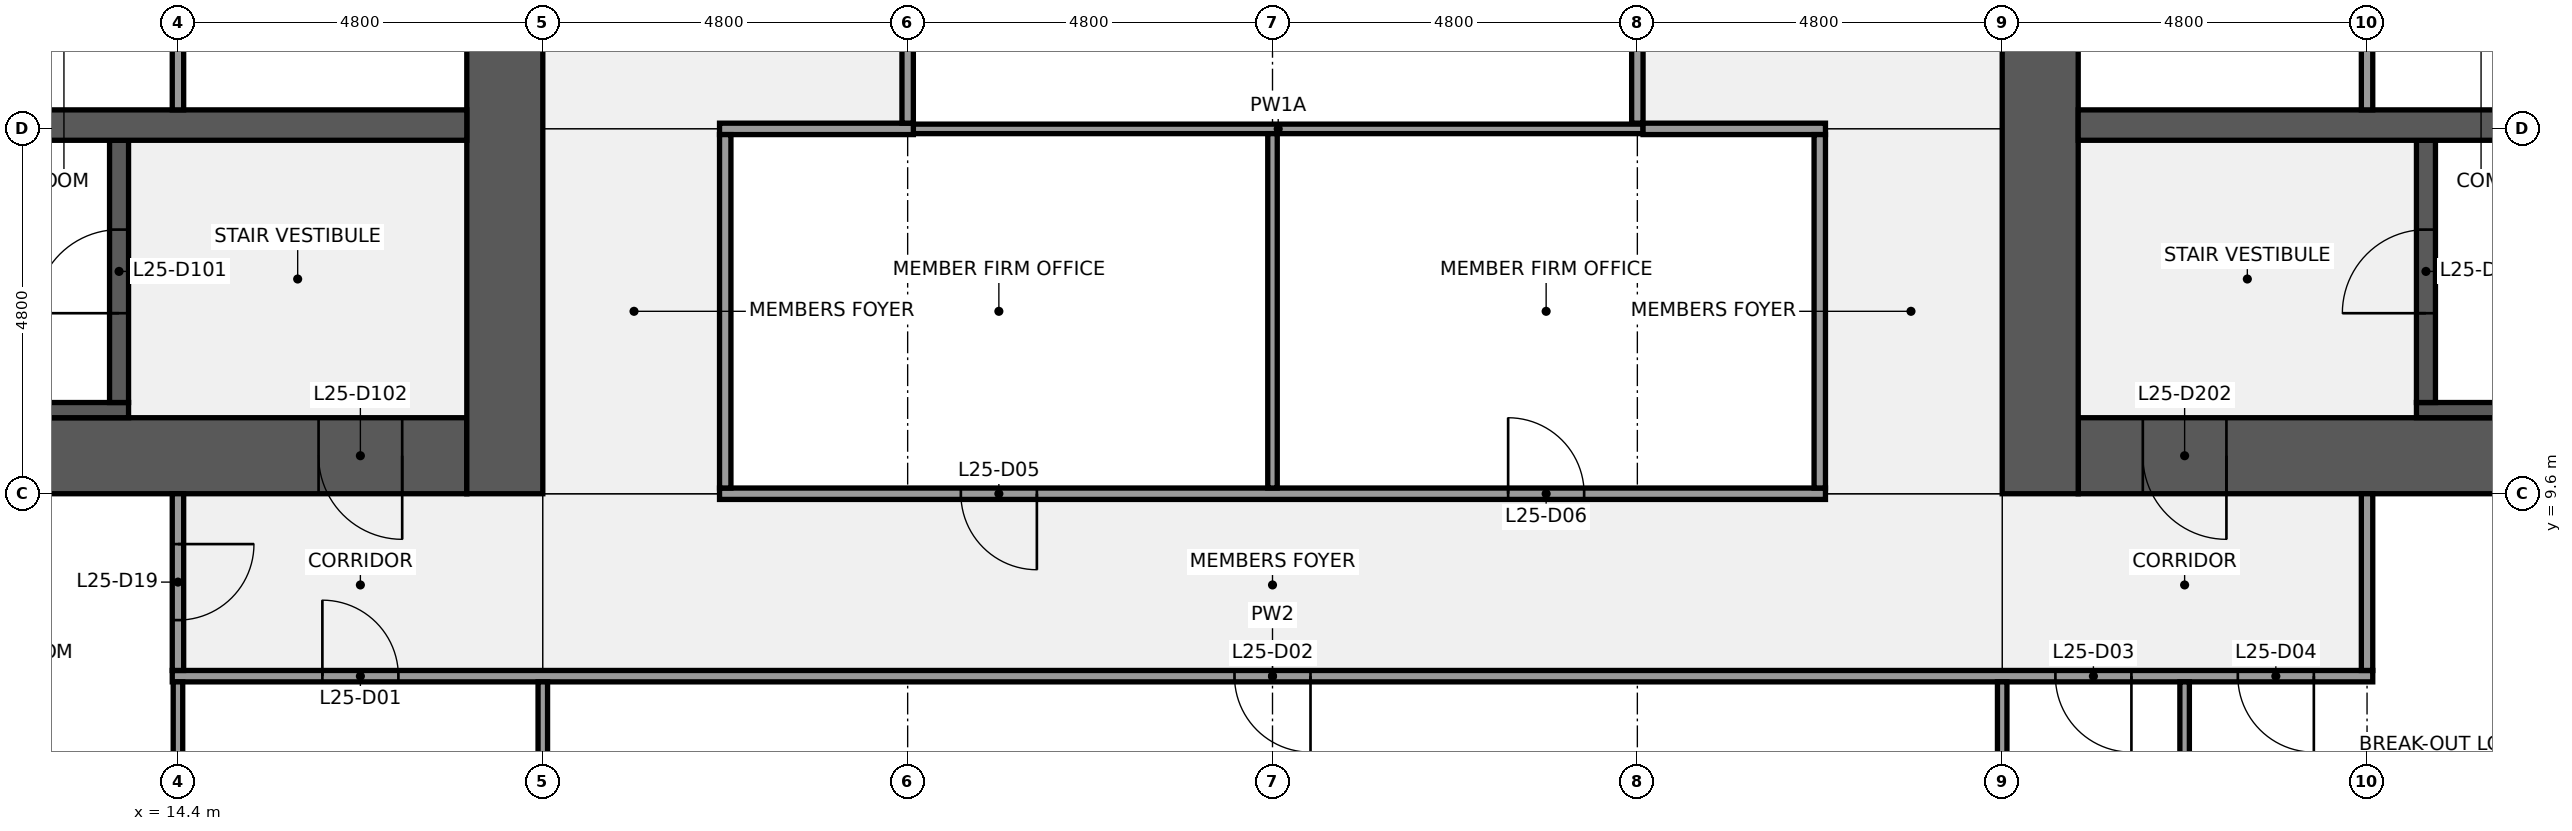
"""IFC4 building model, lengths in metres.
Left out: names, types, materials, properties, quantities, classifications, styles, units other than length and angle.
Written with IfcOpenShell. Run it as: python <this file> out.ifc"""

import sys

from ifc_helpers import new_model, si_unit, direction, frame, frame_2d, origin, place, context, subcontext, project, spatial, rectangle, extrude, element, fill, save


model = new_model("IFC4")
c1 = context("Model", 3, precision=1e-05, world=origin(), true_north=direction((0.0, 1.0)))
c2 = subcontext(c1, "Body", "Model", "MODEL_VIEW")
j1 = project(units=[si_unit("LENGTHUNIT", "METRE"), si_unit("PLANEANGLEUNIT", "RADIAN")], contexts=[c1])
p1 = place(None, origin())
s1 = spatial("IfcSite", under=j1, at=p1, CompositionType="ELEMENT")
p2 = place(p1, origin())
s2 = spatial("IfcBuilding", under=s1, at=p2, CompositionType="ELEMENT")
p3 = place(p2, frame((0.0, 0.0, 120.1)))
s3 = spatial("IfcBuildingStorey", under=s2, at=p3, CompositionType="ELEMENT", Elevation=120.1)
p4 = place(p3, frame((18.2, 10.1, 0.0), z_axis=(0.0, 0.0, 1.0), x_axis=(-1.0, 0.0, 0.0)))
e1 = element("IfcWall", 1, at=p4, inside=s3, PredefinedType="SHEAR", context=c2, shape_type="SweptSolid", body=[
    extrude(rectangle(XDim=8.6, YDim=1.0, at=frame_2d((4.3, 0.0))), origin(), (0.0, 0.0, 1.0), 3.84),
])
p5 = place(p4, frame((0.85, 0.0, 0.0)))
e2 = element("IfcOpeningElement", 2, at=p5, cuts=e1, PredefinedType="OPENING", context=c2, shape_type="SweptSolid", body=[
    extrude(rectangle(XDim=1.1, YDim=2.1, at=frame_2d((0.55, 1.05))), frame((0.0, 0.51, 0.0), z_axis=(0.0, -1.0, 0.0), x_axis=(1.0, 0.0, 0.0)), (0.0, 0.0, 1.0), 1.02),
])
p6 = place(p3, frame((18.7, 38.4, 0.0), z_axis=(0.0, 0.0, 1.0), x_axis=(0.0, -1.0, 0.0)))
e3 = element("IfcWall", 3, at=p6, inside=s3, PredefinedType="SHEAR", context=c2, shape_type="SweptSolid", body=[
    extrude(rectangle(XDim=28.8, YDim=1.0, at=frame_2d((14.4, 0.0))), origin(), (0.0, 0.0, 1.0), 3.84),
])
p7 = place(p6, frame((18.3, 0.0, 0.0)))
e4 = element("IfcOpeningElement", 4, at=p7, cuts=e3, PredefinedType="OPENING", context=c2, shape_type="SweptSolid", body=[
    extrude(rectangle(XDim=1.8, YDim=2.1, at=frame_2d((0.9, 1.05))), frame((0.0, 0.51, 0.0), z_axis=(0.0, -1.0, 0.0), x_axis=(1.0, 0.0, 0.0)), (0.0, 0.0, 1.0), 1.02),
])
p8 = place(p6, frame((8.7, 0.0, 0.0)))
e5 = element("IfcOpeningElement", 5, at=p8, cuts=e3, PredefinedType="OPENING", context=c2, shape_type="SweptSolid", body=[
    extrude(rectangle(XDim=1.8, YDim=2.1, at=frame_2d((0.9, 1.05))), frame((0.0, 0.51, 0.0), z_axis=(0.0, -1.0, 0.0), x_axis=(1.0, 0.0, 0.0)), (0.0, 0.0, 1.0), 1.02),
])
p9 = place(p3, frame((9.6, 10.7, 0.0), z_axis=(0.0, 0.0, 1.0), x_axis=(1.0, 0.0, 0.0)))
e6 = element("IfcWall", 6, at=p9, inside=s3, PredefinedType="SHEAR", context=c2, shape_type="SweptSolid", body=[
    extrude(rectangle(XDim=4.15, YDim=0.2, at=frame_2d((2.075, 0.0))), origin(), (0.0, 0.0, 1.0), 3.84),
])
p10 = place(p3, frame((13.625, 10.8, 0.0), z_axis=(0.0, 0.0, 1.0), x_axis=(0.0, 1.0, 0.0)))
e7 = element("IfcWall", 7, at=p10, inside=s3, PredefinedType="SHEAR", context=c2, shape_type="SweptSolid", body=[
    extrude(rectangle(XDim=3.45, YDim=0.25, at=frame_2d((1.725, 0.0))), origin(), (0.0, 0.0, 1.0), 3.84),
])
p11 = place(p10, frame((1.175, 0.0, 0.0)))
e8 = element("IfcOpeningElement", 8, at=p11, cuts=e7, PredefinedType="OPENING", context=c2, shape_type="SweptSolid", body=[
    extrude(rectangle(XDim=1.1, YDim=2.1, at=frame_2d((0.55, 1.05))), frame((0.0, 0.135, 0.0), z_axis=(0.0, -1.0, 0.0), x_axis=(1.0, 0.0, 0.0)), (0.0, 0.0, 1.0), 0.27),
])
p12 = place(p3, frame((1.0, 14.45, 0.0), z_axis=(0.0, 0.0, 1.0), x_axis=(1.0, 0.0, 0.0)))
e9 = element("IfcWall", 9, at=p12, inside=s3, PredefinedType="SHEAR", context=c2, shape_type="SweptSolid", body=[
    extrude(rectangle(XDim=17.2, YDim=0.4, at=frame_2d((8.6, 0.0))), origin(), (0.0, 0.0, 1.0), 3.84),
])
p13 = place(p3, frame((14.4, 14.65, 0.0), z_axis=(0.0, 0.0, 1.0), x_axis=(0.0, 1.0, 0.0)))
e10 = element("IfcWall", 10, at=p13, inside=s3, PredefinedType="PARTITIONING", context=c2, shape_type="SweptSolid", body=[
    extrude(rectangle(XDim=2.6, YDim=0.15, at=frame_2d((1.3, 0.0))), origin(), (0.0, 0.0, 1.0), 3.84),
])
p14 = place(p3, frame((48.0, 10.1, 0.0), z_axis=(0.0, 0.0, 1.0), x_axis=(-1.0, 0.0, 0.0)))
e11 = element("IfcWall", 11, at=p14, inside=s3, PredefinedType="SHEAR", context=c2, shape_type="SweptSolid", body=[
    extrude(rectangle(XDim=8.6, YDim=1.0, at=frame_2d((4.3, 0.0))), origin(), (0.0, 0.0, 1.0), 3.84),
])
p15 = place(p14, frame((6.65, 0.0, 0.0)))
e12 = element("IfcOpeningElement", 12, at=p15, cuts=e11, PredefinedType="OPENING", context=c2, shape_type="SweptSolid", body=[
    extrude(rectangle(XDim=1.1, YDim=2.1, at=frame_2d((0.55, 1.05))), frame((0.0, 0.51, 0.0), z_axis=(0.0, -1.0, 0.0), x_axis=(1.0, 0.0, 0.0)), (0.0, 0.0, 1.0), 1.02),
])
p16 = place(p3, frame((38.9, 9.6, 0.0), z_axis=(0.0, 0.0, 1.0), x_axis=(0.0, 1.0, 0.0)))
e13 = element("IfcWall", 13, at=p16, inside=s3, PredefinedType="SHEAR", context=c2, shape_type="SweptSolid", body=[
    extrude(rectangle(XDim=28.8, YDim=1.0, at=frame_2d((14.4, 0.0))), origin(), (0.0, 0.0, 1.0), 3.84),
])
p17 = place(p16, frame((8.7, 0.0, 0.0)))
e14 = element("IfcOpeningElement", 14, at=p17, cuts=e13, PredefinedType="OPENING", context=c2, shape_type="SweptSolid", body=[
    extrude(rectangle(XDim=1.8, YDim=2.1, at=frame_2d((0.9, 1.05))), frame((0.0, 0.51, 0.0), z_axis=(0.0, -1.0, 0.0), x_axis=(1.0, 0.0, 0.0)), (0.0, 0.0, 1.0), 1.02),
])
p18 = place(p16, frame((18.3, 0.0, 0.0)))
e15 = element("IfcOpeningElement", 15, at=p18, cuts=e13, PredefinedType="OPENING", context=c2, shape_type="SweptSolid", body=[
    extrude(rectangle(XDim=1.8, YDim=2.1, at=frame_2d((0.9, 1.05))), frame((0.0, 0.51, 0.0), z_axis=(0.0, -1.0, 0.0), x_axis=(1.0, 0.0, 0.0)), (0.0, 0.0, 1.0), 1.02),
])
p19 = place(p3, frame((43.85, 10.7, 0.0), z_axis=(0.0, 0.0, 1.0), x_axis=(1.0, 0.0, 0.0)))
e16 = element("IfcWall", 16, at=p19, inside=s3, PredefinedType="SHEAR", context=c2, shape_type="SweptSolid", body=[
    extrude(rectangle(XDim=4.15, YDim=0.2, at=frame_2d((2.075, 0.0))), origin(), (0.0, 0.0, 1.0), 3.84),
])
p20 = place(p3, frame((43.975, 10.8, 0.0), z_axis=(0.0, 0.0, 1.0), x_axis=(0.0, 1.0, 0.0)))
e17 = element("IfcWall", 17, at=p20, inside=s3, PredefinedType="SHEAR", context=c2, shape_type="SweptSolid", body=[
    extrude(rectangle(XDim=3.45, YDim=0.25, at=frame_2d((1.725, 0.0))), origin(), (0.0, 0.0, 1.0), 3.84),
])
p21 = place(p20, frame((1.175, 0.0, 0.0)))
e18 = element("IfcOpeningElement", 18, at=p21, cuts=e17, PredefinedType="OPENING", context=c2, shape_type="SweptSolid", body=[
    extrude(rectangle(XDim=1.1, YDim=2.1, at=frame_2d((0.55, 1.05))), frame((0.0, 0.135, 0.0), z_axis=(0.0, -1.0, 0.0), x_axis=(1.0, 0.0, 0.0)), (0.0, 0.0, 1.0), 0.27),
])
p22 = place(p3, frame((39.4, 14.45, 0.0), z_axis=(0.0, 0.0, 1.0), x_axis=(1.0, 0.0, 0.0)))
e19 = element("IfcWall", 19, at=p22, inside=s3, PredefinedType="SHEAR", context=c2, shape_type="SweptSolid", body=[
    extrude(rectangle(XDim=17.2, YDim=0.4, at=frame_2d((8.6, 0.0))), origin(), (0.0, 0.0, 1.0), 3.84),
])
p23 = place(p3, frame((43.2, 14.65, 0.0), z_axis=(0.0, 0.0, 1.0), x_axis=(0.0, 1.0, 0.0)))
e20 = element("IfcWall", 20, at=p23, inside=s3, PredefinedType="PARTITIONING", context=c2, shape_type="SweptSolid", body=[
    extrude(rectangle(XDim=2.6, YDim=0.15, at=frame_2d((1.3, 0.0))), origin(), (0.0, 0.0, 1.0), 3.84),
])
p24 = place(p3, frame((14.325, 7.2, 0.0), z_axis=(0.0, 0.0, 1.0), x_axis=(1.0, 0.0, 0.0)))
e21 = element("IfcWall", 21, at=p24, inside=s3, PredefinedType="PARTITIONING", context=c2, shape_type="SweptSolid", body=[
    extrude(rectangle(XDim=28.95, YDim=0.15, at=frame_2d((14.475, 0.0))), origin(), (0.0, 0.0, 1.0), 2.936),
])
p25 = place(p24, frame((1.975, 0.0, 0.0)))
e22 = element("IfcOpeningElement", 22, at=p25, cuts=e21, PredefinedType="OPENING", context=c2, shape_type="SweptSolid", body=[
    extrude(rectangle(XDim=1.0, YDim=2.1, at=frame_2d((0.5, 1.05))), frame((0.0, 0.085, 0.0), z_axis=(0.0, -1.0, 0.0), x_axis=(1.0, 0.0, 0.0)), (0.0, 0.0, 1.0), 0.17),
])
p26 = place(p24, frame((13.975, 0.0, 0.0)))
e23 = element("IfcOpeningElement", 23, at=p26, cuts=e21, PredefinedType="OPENING", context=c2, shape_type="SweptSolid", body=[
    extrude(rectangle(XDim=1.0, YDim=2.1, at=frame_2d((0.5, 1.05))), frame((0.0, 0.085, 0.0), z_axis=(0.0, -1.0, 0.0), x_axis=(1.0, 0.0, 0.0)), (0.0, 0.0, 1.0), 0.17),
])
p27 = place(p24, frame((24.775, 0.0, 0.0)))
e24 = element("IfcOpeningElement", 24, at=p27, cuts=e21, PredefinedType="OPENING", context=c2, shape_type="SweptSolid", body=[
    extrude(rectangle(XDim=1.0, YDim=2.1, at=frame_2d((0.5, 1.05))), frame((0.0, 0.085, 0.0), z_axis=(0.0, -1.0, 0.0), x_axis=(1.0, 0.0, 0.0)), (0.0, 0.0, 1.0), 0.17),
])
p28 = place(p24, frame((27.175, 0.0, 0.0)))
e25 = element("IfcOpeningElement", 25, at=p28, cuts=e21, PredefinedType="OPENING", context=c2, shape_type="SweptSolid", body=[
    extrude(rectangle(XDim=1.0, YDim=2.1, at=frame_2d((0.5, 1.05))), frame((0.0, 0.085, 0.0), z_axis=(0.0, -1.0, 0.0), x_axis=(1.0, 0.0, 0.0)), (0.0, 0.0, 1.0), 0.17),
])
p29 = place(p3, frame((21.525, 9.6, 0.0), z_axis=(0.0, 0.0, 1.0), x_axis=(1.0, 0.0, 0.0)))
e26 = element("IfcWall", 26, at=p29, inside=s3, PredefinedType="PARTITIONING", context=c2, shape_type="SweptSolid", body=[
    extrude(rectangle(XDim=14.55, YDim=0.15, at=frame_2d((7.275, 0.0))), origin(), (0.0, 0.0, 1.0), 2.936),
])
p30 = place(p29, frame((3.175, 0.0, 0.0)))
e27 = element("IfcOpeningElement", 27, at=p30, cuts=e26, PredefinedType="OPENING", context=c2, shape_type="SweptSolid", body=[
    extrude(rectangle(XDim=1.0, YDim=2.1, at=frame_2d((0.5, 1.05))), frame((0.0, 0.085, 0.0), z_axis=(0.0, -1.0, 0.0), x_axis=(1.0, 0.0, 0.0)), (0.0, 0.0, 1.0), 0.17),
])
p31 = place(p29, frame((10.375, 0.0, 0.0)))
e28 = element("IfcOpeningElement", 28, at=p31, cuts=e26, PredefinedType="OPENING", context=c2, shape_type="SweptSolid", body=[
    extrude(rectangle(XDim=1.0, YDim=2.1, at=frame_2d((0.5, 1.05))), frame((0.0, 0.085, 0.0), z_axis=(0.0, -1.0, 0.0), x_axis=(1.0, 0.0, 0.0)), (0.0, 0.0, 1.0), 0.17),
])
p32 = place(p3, frame((24.075, 14.4, 0.0), z_axis=(0.0, 0.0, 1.0), x_axis=(1.0, 0.0, 0.0)))
e29 = element("IfcWall", 29, at=p32, inside=s3, PredefinedType="PARTITIONING", context=c2, shape_type="SweptSolid", body=[
    extrude(rectangle(XDim=9.6, YDim=0.125, at=frame_2d((4.8, 0.0))), origin(), (0.0, 0.0, 1.0), 2.936),
])
p33 = place(p3, frame((21.525, 14.4, 0.0), z_axis=(0.0, 0.0, 1.0), x_axis=(1.0, 0.0, 0.0)))
e30 = element("IfcWall", 30, at=p33, inside=s3, PredefinedType="PARTITIONING", context=c2, shape_type="SweptSolid", body=[
    extrude(rectangle(XDim=2.55, YDim=0.15, at=frame_2d((1.275, 0.0))), origin(), (0.0, 0.0, 1.0), 2.936),
])
p34 = place(p3, frame((33.675, 14.4, 0.0), z_axis=(0.0, 0.0, 1.0), x_axis=(1.0, 0.0, 0.0)))
e31 = element("IfcWall", 31, at=p34, inside=s3, PredefinedType="PARTITIONING", context=c2, shape_type="SweptSolid", body=[
    extrude(rectangle(XDim=2.4, YDim=0.15, at=frame_2d((1.2, 0.0))), origin(), (0.0, 0.0, 1.0), 2.936),
])
p35 = place(p3, frame((14.4, 4.9, 0.0), z_axis=(0.0, 0.0, 1.0), x_axis=(0.0, 1.0, 0.0)))
e32 = element("IfcWall", 32, at=p35, inside=s3, PredefinedType="PARTITIONING", context=c2, shape_type="SweptSolid", body=[
    extrude(rectangle(XDim=2.225, YDim=0.125, at=frame_2d((1.113, 0.0))), origin(), (0.0, 0.0, 1.0), 2.936),
])
p36 = place(p3, frame((14.4, 7.275, 0.0), z_axis=(0.0, 0.0, 1.0), x_axis=(0.0, 1.0, 0.0)))
e33 = element("IfcWall", 33, at=p36, inside=s3, PredefinedType="PARTITIONING", context=c2, shape_type="SweptSolid", body=[
    extrude(rectangle(XDim=2.325, YDim=0.15, at=frame_2d((1.163, 0.0))), origin(), (0.0, 0.0, 1.0), 2.936),
])
p37 = place(p36, frame((0.663, 0.0, 0.0)))
e34 = element("IfcOpeningElement", 34, at=p37, cuts=e33, PredefinedType="OPENING", context=c2, shape_type="SweptSolid", body=[
    extrude(rectangle(XDim=1.0, YDim=2.1, at=frame_2d((0.5, 1.05))), frame((0.0, 0.085, 0.0), z_axis=(0.0, -1.0, 0.0), x_axis=(1.0, 0.0, 0.0)), (0.0, 0.0, 1.0), 0.17),
])
p38 = place(p3, frame((19.2, 0.6, 0.0), z_axis=(0.0, 0.0, 1.0), x_axis=(0.0, 1.0, 0.0)))
e35 = element("IfcWall", 35, at=p38, inside=s3, PredefinedType="PARTITIONING", context=c2, shape_type="SweptSolid", body=[
    extrude(rectangle(XDim=6.525, YDim=0.125, at=frame_2d((3.262, 0.0))), origin(), (0.0, 0.0, 1.0), 2.936),
])
p39 = place(p3, frame((21.6, 9.675, 0.0), z_axis=(0.0, 0.0, 1.0), x_axis=(0.0, 1.0, 0.0)))
e36 = element("IfcWall", 36, at=p39, inside=s3, PredefinedType="PARTITIONING", context=c2, shape_type="SweptSolid", body=[
    extrude(rectangle(XDim=4.65, YDim=0.15, at=frame_2d((2.325, 0.0))), origin(), (0.0, 0.0, 1.0), 2.936),
])
p40 = place(p3, frame((24.0, 14.475, 0.0), z_axis=(0.0, 0.0, 1.0), x_axis=(0.0, 1.0, 0.0)))
e37 = element("IfcWall", 37, at=p40, inside=s3, PredefinedType="PARTITIONING", context=c2, shape_type="SweptSolid", body=[
    extrude(rectangle(XDim=8.25, YDim=0.15, at=frame_2d((4.125, 0.0))), origin(), (0.0, 0.0, 1.0), 2.936),
])
p41 = place(p3, frame((28.8, 9.675, 0.0), z_axis=(0.0, 0.0, 1.0), x_axis=(0.0, 1.0, 0.0)))
e38 = element("IfcWall", 38, at=p41, inside=s3, PredefinedType="PARTITIONING", context=c2, shape_type="SweptSolid", body=[
    extrude(rectangle(XDim=4.662, YDim=0.125, at=frame_2d((2.331, 0.0))), origin(), (0.0, 0.0, 1.0), 2.936),
])
p42 = place(p3, frame((33.6, 14.475, 0.0), z_axis=(0.0, 0.0, 1.0), x_axis=(0.0, 1.0, 0.0)))
e39 = element("IfcWall", 39, at=p42, inside=s3, PredefinedType="PARTITIONING", context=c2, shape_type="SweptSolid", body=[
    extrude(rectangle(XDim=8.25, YDim=0.15, at=frame_2d((4.125, 0.0))), origin(), (0.0, 0.0, 1.0), 2.936),
])
p43 = place(p3, frame((36.0, 9.675, 0.0), z_axis=(0.0, 0.0, 1.0), x_axis=(0.0, 1.0, 0.0)))
e40 = element("IfcWall", 40, at=p43, inside=s3, PredefinedType="PARTITIONING", context=c2, shape_type="SweptSolid", body=[
    extrude(rectangle(XDim=4.65, YDim=0.15, at=frame_2d((2.325, 0.0))), origin(), (0.0, 0.0, 1.0), 2.936),
])
p44 = place(p3, frame((38.4, 0.6, 0.0), z_axis=(0.0, 0.0, 1.0), x_axis=(0.0, 1.0, 0.0)))
e41 = element("IfcWall", 41, at=p44, inside=s3, PredefinedType="PARTITIONING", context=c2, shape_type="SweptSolid", body=[
    extrude(rectangle(XDim=6.525, YDim=0.125, at=frame_2d((3.262, 0.0))), origin(), (0.0, 0.0, 1.0), 2.936),
])
p45 = place(p3, frame((40.8, 3.663, 0.0), z_axis=(0.0, 0.0, 1.0), x_axis=(0.0, 1.0, 0.0)))
e42 = element("IfcWall", 42, at=p45, inside=s3, PredefinedType="PARTITIONING", context=c2, shape_type="SweptSolid", body=[
    extrude(rectangle(XDim=3.462, YDim=0.125, at=frame_2d((1.731, 0.0))), origin(), (0.0, 0.0, 1.0), 2.936),
])
p46 = place(p3, frame((43.2, 7.275, 0.0), z_axis=(0.0, 0.0, 1.0), x_axis=(0.0, 1.0, 0.0)))
e43 = element("IfcWall", 43, at=p46, inside=s3, PredefinedType="PARTITIONING", context=c2, shape_type="SweptSolid", body=[
    extrude(rectangle(XDim=2.325, YDim=0.15, at=frame_2d((1.163, 0.0))), origin(), (0.0, 0.0, 1.0), 2.936),
])
p47 = place(p11, origin())
e44 = element("IfcDoor", 44, at=p47, inside=s3, OperationType="SINGLE_SWING_LEFT", PredefinedType="DOOR", context=c2, shape_type="SweptSolid", body=[
    extrude(rectangle(XDim=1.1, YDim=2.1, at=frame_2d((0.55, 1.05))), frame((0.0, 0.025, 0.0), z_axis=(0.0, -1.0, 0.0), x_axis=(1.0, 0.0, 0.0)), (0.0, 0.0, 1.0), 0.05),
])
fill(e8, e44)
p48 = place(p5, origin())
e45 = element("IfcDoor", 45, at=p48, inside=s3, OperationType="SINGLE_SWING_LEFT", PredefinedType="DOOR", context=c2, shape_type="SweptSolid", body=[
    extrude(rectangle(XDim=1.1, YDim=2.1, at=frame_2d((0.55, 1.05))), frame((0.0, 0.025, 0.0), z_axis=(0.0, -1.0, 0.0), x_axis=(1.0, 0.0, 0.0)), (0.0, 0.0, 1.0), 0.05),
])
fill(e2, e45)
p49 = place(p21, origin())
e46 = element("IfcDoor", 46, at=p49, inside=s3, OperationType="SINGLE_SWING_LEFT", PredefinedType="DOOR", context=c2, shape_type="SweptSolid", body=[
    extrude(rectangle(XDim=1.1, YDim=2.1, at=frame_2d((0.55, 1.05))), frame((0.0, 0.025, 0.0), z_axis=(0.0, -1.0, 0.0), x_axis=(1.0, 0.0, 0.0)), (0.0, 0.0, 1.0), 0.05),
])
fill(e18, e46)
p50 = place(p15, origin())
e47 = element("IfcDoor", 47, at=p50, inside=s3, OperationType="SINGLE_SWING_LEFT", PredefinedType="DOOR", context=c2, shape_type="SweptSolid", body=[
    extrude(rectangle(XDim=1.1, YDim=2.1, at=frame_2d((0.55, 1.05))), frame((0.0, 0.025, 0.0), z_axis=(0.0, -1.0, 0.0), x_axis=(1.0, 0.0, 0.0)), (0.0, 0.0, 1.0), 0.05),
])
fill(e12, e47)
p51 = place(p25, origin())
e48 = element("IfcDoor", 48, at=p51, inside=s3, OperationType="SINGLE_SWING_LEFT", PredefinedType="DOOR", context=c2, shape_type="SweptSolid", body=[
    extrude(rectangle(XDim=1.0, YDim=2.1, at=frame_2d((0.5, 1.05))), frame((0.0, 0.025, 0.0), z_axis=(0.0, -1.0, 0.0), x_axis=(1.0, 0.0, 0.0)), (0.0, 0.0, 1.0), 0.05),
])
fill(e22, e48)
p52 = place(p26, origin())
e49 = element("IfcDoor", 49, at=p52, inside=s3, OperationType="SINGLE_SWING_RIGHT", PredefinedType="DOOR", context=c2, shape_type="SweptSolid", body=[
    extrude(rectangle(XDim=1.0, YDim=2.1, at=frame_2d((0.5, 1.05))), frame((0.0, 0.025, 0.0), z_axis=(0.0, -1.0, 0.0), x_axis=(1.0, 0.0, 0.0)), (0.0, 0.0, 1.0), 0.05),
])
fill(e23, e49)
p53 = place(p27, origin())
e50 = element("IfcDoor", 50, at=p53, inside=s3, OperationType="SINGLE_SWING_RIGHT", PredefinedType="DOOR", context=c2, shape_type="SweptSolid", body=[
    extrude(rectangle(XDim=1.0, YDim=2.1, at=frame_2d((0.5, 1.05))), frame((0.0, 0.025, 0.0), z_axis=(0.0, -1.0, 0.0), x_axis=(1.0, 0.0, 0.0)), (0.0, 0.0, 1.0), 0.05),
])
fill(e24, e50)
p54 = place(p28, origin())
e51 = element("IfcDoor", 51, at=p54, inside=s3, OperationType="SINGLE_SWING_RIGHT", PredefinedType="DOOR", context=c2, shape_type="SweptSolid", body=[
    extrude(rectangle(XDim=1.0, YDim=2.1, at=frame_2d((0.5, 1.05))), frame((0.0, 0.025, 0.0), z_axis=(0.0, -1.0, 0.0), x_axis=(1.0, 0.0, 0.0)), (0.0, 0.0, 1.0), 0.05),
])
fill(e25, e51)
p55 = place(p30, origin())
e52 = element("IfcDoor", 52, at=p55, inside=s3, OperationType="SINGLE_SWING_RIGHT", PredefinedType="DOOR", context=c2, shape_type="SweptSolid", body=[
    extrude(rectangle(XDim=1.0, YDim=2.1, at=frame_2d((0.5, 1.05))), frame((0.0, 0.025, 0.0), z_axis=(0.0, -1.0, 0.0), x_axis=(1.0, 0.0, 0.0)), (0.0, 0.0, 1.0), 0.05),
])
fill(e27, e52)
p56 = place(p31, origin())
e53 = element("IfcDoor", 53, at=p56, inside=s3, OperationType="SINGLE_SWING_LEFT", PredefinedType="DOOR", context=c2, shape_type="SweptSolid", body=[
    extrude(rectangle(XDim=1.0, YDim=2.1, at=frame_2d((0.5, 1.05))), frame((0.0, 0.025, 0.0), z_axis=(0.0, -1.0, 0.0), x_axis=(1.0, 0.0, 0.0)), (0.0, 0.0, 1.0), 0.05),
])
fill(e28, e53)
p57 = place(p37, origin())
e54 = element("IfcDoor", 54, at=p57, inside=s3, OperationType="SINGLE_SWING_RIGHT", PredefinedType="DOOR", context=c2, shape_type="SweptSolid", body=[
    extrude(rectangle(XDim=1.0, YDim=2.1, at=frame_2d((0.5, 1.05))), frame((0.0, 0.025, 0.0), z_axis=(0.0, -1.0, 0.0), x_axis=(1.0, 0.0, 0.0)), (0.0, 0.0, 1.0), 0.05),
])
fill(e34, e54)
save(model, sys.argv[1])
